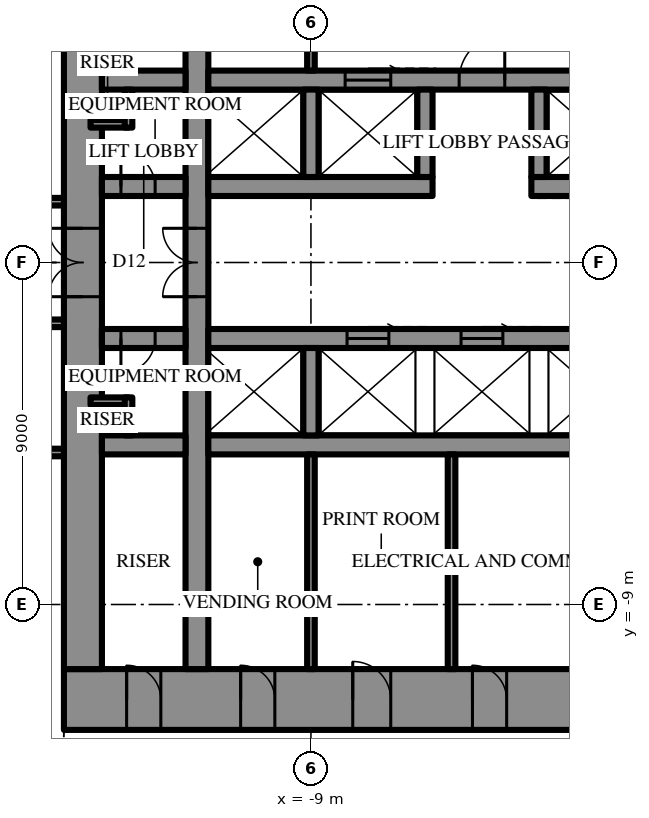
"""IFC4 building model, lengths in metres.
Left out: names, types, materials, properties, quantities, classifications, styles, units other than length and angle.
Written with IfcOpenShell. Run it as: python <this file> out.ifc"""

import sys

from ifc_helpers import new_model, si_unit, direction, frame, frame_2d, origin, place, context, subcontext, project, spatial, rectangle, extrude, element, fill, save


model = new_model("IFC4")
c1 = context("Model", 3, precision=1e-05, world=origin(), true_north=direction((0.0, 1.0)))
c2 = subcontext(c1, "Body", "Model", "MODEL_VIEW")
j1 = project(units=[si_unit("LENGTHUNIT", "METRE"), si_unit("PLANEANGLEUNIT", "RADIAN")], contexts=[c1])
p1 = place(None, origin())
s1 = spatial("IfcSite", under=j1, at=p1, CompositionType="ELEMENT")
p2 = place(p1, origin())
s2 = spatial("IfcBuilding", under=s1, at=p2, CompositionType="ELEMENT")
p3 = place(p2, frame((0.0, 0.0, 265.9)))
s3 = spatial("IfcBuildingStorey", under=s2, at=p3, CompositionType="ELEMENT", Elevation=265.9)
p4 = place(p3, frame((15.5, -11.5, 0.0), z_axis=(0.0, 0.0, 1.0), x_axis=(-1.0, 0.0, 0.0)))
e1 = element("IfcWall", 1, at=p4, inside=s3, PredefinedType="SHEAR", context=c2, shape_type="SweptSolid", body=[
    extrude(rectangle(XDim=31.0, YDim=1.6, at=frame_2d((15.5, 0.0))), origin(), (0.0, 0.0, 1.0), 4.2),
])
p5 = place(p4, frame((16.35, 0.0, 0.0)))
e2 = element("IfcOpeningElement", 2, at=p5, cuts=e1, PredefinedType="OPENING", context=c2, shape_type="SweptSolid", body=[
    extrude(rectangle(XDim=0.9, YDim=2.2, at=frame_2d((0.45, 1.1))), frame((0.0, 0.81, 0.0), z_axis=(0.0, -1.0, 0.0), x_axis=(1.0, 0.0, 0.0)), (0.0, 0.0, 1.0), 1.62),
])
p6 = place(p4, frame((19.35, 0.0, 0.0)))
e3 = element("IfcOpeningElement", 3, at=p6, cuts=e1, PredefinedType="OPENING", context=c2, shape_type="SweptSolid", body=[
    extrude(rectangle(XDim=0.9, YDim=2.2, at=frame_2d((0.45, 1.1))), frame((0.0, 0.81, 0.0), z_axis=(0.0, -1.0, 0.0), x_axis=(1.0, 0.0, 0.0)), (0.0, 0.0, 1.0), 1.62),
])
p7 = place(p4, frame((22.4, 0.0, 0.0)))
e4 = element("IfcOpeningElement", 4, at=p7, cuts=e1, PredefinedType="OPENING", context=c2, shape_type="SweptSolid", body=[
    extrude(rectangle(XDim=1.0, YDim=2.2, at=frame_2d((0.5, 1.1))), frame((0.0, 0.81, 0.0), z_axis=(0.0, -1.0, 0.0), x_axis=(1.0, 0.0, 0.0)), (0.0, 0.0, 1.0), 1.62),
])
p8 = place(p4, frame((1.65, 0.0, 0.0)))
e5 = element("IfcOpeningElement", 5, at=p8, cuts=e1, PredefinedType="OPENING", context=c2, shape_type="SweptSolid", body=[
    extrude(rectangle(XDim=0.9, YDim=2.2, at=frame_2d((0.45, 1.1))), frame((0.0, 0.81, 0.0), z_axis=(0.0, -1.0, 0.0), x_axis=(1.0, 0.0, 0.0)), (0.0, 0.0, 1.0), 1.62),
])
p9 = place(p4, frame((4.65, 0.0, 0.0)))
e6 = element("IfcOpeningElement", 6, at=p9, cuts=e1, PredefinedType="OPENING", context=c2, shape_type="SweptSolid", body=[
    extrude(rectangle(XDim=0.9, YDim=2.2, at=frame_2d((0.45, 1.1))), frame((0.0, 0.81, 0.0), z_axis=(0.0, -1.0, 0.0), x_axis=(1.0, 0.0, 0.0)), (0.0, 0.0, 1.0), 1.62),
])
p10 = place(p4, frame((25.45, 0.0, 0.0)))
e7 = element("IfcOpeningElement", 7, at=p10, cuts=e1, PredefinedType="OPENING", context=c2, shape_type="SweptSolid", body=[
    extrude(rectangle(XDim=0.9, YDim=2.2, at=frame_2d((0.45, 1.1))), frame((0.0, 0.81, 0.0), z_axis=(0.0, -1.0, 0.0), x_axis=(1.0, 0.0, 0.0)), (0.0, 0.0, 1.0), 1.62),
])
p11 = place(p4, frame((28.45, 0.0, 0.0)))
e8 = element("IfcOpeningElement", 8, at=p11, cuts=e1, PredefinedType="OPENING", context=c2, shape_type="SweptSolid", body=[
    extrude(rectangle(XDim=0.9, YDim=2.2, at=frame_2d((0.45, 1.1))), frame((0.0, 0.81, 0.0), z_axis=(0.0, -1.0, 0.0), x_axis=(1.0, 0.0, 0.0)), (0.0, 0.0, 1.0), 1.62),
])
p12 = place(p3, frame((-15.0, 10.7, 0.0), z_axis=(0.0, 0.0, 1.0), x_axis=(0.0, -1.0, 0.0)))
e9 = element("IfcWall", 9, at=p12, inside=s3, PredefinedType="SHEAR", context=c2, shape_type="SweptSolid", body=[
    extrude(rectangle(XDim=21.4, YDim=1.0, at=frame_2d((10.7, 0.0))), origin(), (0.0, 0.0, 1.0), 4.2),
])
p13 = place(p12, frame((9.8, 0.0, 0.0)))
e10 = element("IfcOpeningElement", 10, at=p13, cuts=e9, PredefinedType="OPENING", context=c2, shape_type="SweptSolid", body=[
    extrude(rectangle(XDim=1.8, YDim=2.4, at=frame_2d((0.9, 1.2))), frame((0.0, 0.51, 0.0), z_axis=(0.0, -1.0, 0.0), x_axis=(1.0, 0.0, 0.0)), (0.0, 0.0, 1.0), 1.02),
])
p14 = place(p3, frame((-12.0, -10.7, 0.0), z_axis=(0.0, 0.0, 1.0), x_axis=(0.0, 1.0, 0.0)))
e11 = element("IfcWall", 11, at=p14, inside=s3, PredefinedType="SHEAR", context=c2, shape_type="SweptSolid", body=[
    extrude(rectangle(XDim=21.4, YDim=0.6, at=frame_2d((10.7, 0.0))), origin(), (0.0, 0.0, 1.0), 4.2),
])
p15 = place(p14, frame((9.8, 0.0, 0.0)))
e12 = element("IfcOpeningElement", 12, at=p15, cuts=e11, PredefinedType="OPENING", context=c2, shape_type="SweptSolid", body=[
    extrude(rectangle(XDim=1.8, YDim=2.4, at=frame_2d((0.9, 1.2))), frame((0.0, 0.31, 0.0), z_axis=(0.0, -1.0, 0.0), x_axis=(1.0, 0.0, 0.0)), (0.0, 0.0, 1.0), 0.62),
])
p16 = place(p3, frame((-14.5, 2.0, 0.0), z_axis=(0.0, 0.0, 1.0), x_axis=(1.0, 0.0, 0.0)))
e13 = element("IfcWall", 13, at=p16, inside=s3, PredefinedType="SHEAR", context=c2, shape_type="SweptSolid", body=[
    extrude(rectangle(XDim=2.2, YDim=0.5, at=frame_2d((1.1, 0.0))), origin(), (0.0, 0.0, 1.0), 4.2),
])
p17 = place(p16, frame((0.5, 0.0, 0.0)))
e14 = element("IfcOpeningElement", 14, at=p17, cuts=e13, PredefinedType="OPENING", context=c2, shape_type="SweptSolid", body=[
    extrude(rectangle(XDim=0.9, YDim=2.2, at=frame_2d((0.45, 1.1))), frame((0.0, 0.26, 0.0), z_axis=(0.0, -1.0, 0.0), x_axis=(1.0, 0.0, 0.0)), (0.0, 0.0, 1.0), 0.52),
])
p18 = place(p3, frame((-11.7, 2.0, 0.0), z_axis=(0.0, 0.0, 1.0), x_axis=(1.0, 0.0, 0.0)))
e15 = element("IfcWall", 15, at=p18, inside=s3, PredefinedType="SHEAR", context=c2, shape_type="SweptSolid", body=[
    extrude(rectangle(XDim=5.9, YDim=0.5, at=frame_2d((2.95, 0.0))), origin(), (0.0, 0.0, 1.0), 4.2),
])
p19 = place(p3, frame((-3.2, 2.0, 0.0), z_axis=(0.0, 0.0, 1.0), x_axis=(1.0, 0.0, 0.0)))
e16 = element("IfcWall", 16, at=p19, inside=s3, PredefinedType="SHEAR", context=c2, shape_type="SweptSolid", body=[
    extrude(rectangle(XDim=14.9, YDim=0.5, at=frame_2d((7.45, 0.0))), origin(), (0.0, 0.0, 1.0), 4.2),
])
p20 = place(p19, frame((1.15, 0.0, 0.0)))
e17 = element("IfcOpeningElement", 17, at=p20, cuts=e16, PredefinedType="OPENING", context=c2, shape_type="SweptSolid", body=[
    extrude(rectangle(XDim=1.1, YDim=2.2, at=frame_2d((0.55, 1.1))), frame((0.0, 0.26, 0.0), z_axis=(0.0, -1.0, 0.0), x_axis=(1.0, 0.0, 0.0)), (0.0, 0.0, 1.0), 0.52),
])
p21 = place(p19, frame((4.15, 0.0, 0.0)))
e18 = element("IfcOpeningElement", 18, at=p21, cuts=e16, PredefinedType="OPENING", context=c2, shape_type="SweptSolid", body=[
    extrude(rectangle(XDim=1.1, YDim=2.2, at=frame_2d((0.55, 1.1))), frame((0.0, 0.26, 0.0), z_axis=(0.0, -1.0, 0.0), x_axis=(1.0, 0.0, 0.0)), (0.0, 0.0, 1.0), 0.52),
])
p22 = place(p19, frame((7.15, 0.0, 0.0)))
e19 = element("IfcOpeningElement", 19, at=p22, cuts=e16, PredefinedType="OPENING", context=c2, shape_type="SweptSolid", body=[
    extrude(rectangle(XDim=1.1, YDim=2.2, at=frame_2d((0.55, 1.1))), frame((0.0, 0.26, 0.0), z_axis=(0.0, -1.0, 0.0), x_axis=(1.0, 0.0, 0.0)), (0.0, 0.0, 1.0), 0.52),
])
p23 = place(p19, frame((10.15, 0.0, 0.0)))
e20 = element("IfcOpeningElement", 20, at=p23, cuts=e16, PredefinedType="OPENING", context=c2, shape_type="SweptSolid", body=[
    extrude(rectangle(XDim=1.1, YDim=2.2, at=frame_2d((0.55, 1.1))), frame((0.0, 0.26, 0.0), z_axis=(0.0, -1.0, 0.0), x_axis=(1.0, 0.0, 0.0)), (0.0, 0.0, 1.0), 0.52),
])
p24 = place(p3, frame((-14.5, 4.8, 0.0), z_axis=(0.0, 0.0, 1.0), x_axis=(1.0, 0.0, 0.0)))
e21 = element("IfcWall", 21, at=p24, inside=s3, PredefinedType="SHEAR", context=c2, shape_type="SweptSolid", body=[
    extrude(rectangle(XDim=2.2, YDim=0.5, at=frame_2d((1.1, 0.0))), origin(), (0.0, 0.0, 1.0), 4.2),
])
p25 = place(p3, frame((-11.7, 4.8, 0.0), z_axis=(0.0, 0.0, 1.0), x_axis=(1.0, 0.0, 0.0)))
e22 = element("IfcWall", 22, at=p25, inside=s3, PredefinedType="SHEAR", context=c2, shape_type="SweptSolid", body=[
    extrude(rectangle(XDim=23.4, YDim=0.5, at=frame_2d((11.7, 0.0))), origin(), (0.0, 0.0, 1.0), 4.2),
])
p26 = place(p25, frame((6.6, 0.0, 0.0)))
e23 = element("IfcOpeningElement", 23, at=p26, cuts=e22, PredefinedType="OPENING", context=c2, shape_type="SweptSolid", body=[
    extrude(rectangle(XDim=1.2, YDim=2.2, at=frame_2d((0.6, 1.1))), frame((0.0, 0.26, 0.0), z_axis=(0.0, -1.0, 0.0), x_axis=(1.0, 0.0, 0.0)), (0.0, 0.0, 1.0), 0.52),
])
p27 = place(p25, frame((3.6, 0.0, 0.0)))
e24 = element("IfcOpeningElement", 24, at=p27, cuts=e22, PredefinedType="OPENING", context=c2, shape_type="SweptSolid", body=[
    extrude(rectangle(XDim=1.2, YDim=2.2, at=frame_2d((0.6, 1.1))), frame((0.0, 0.26, 0.0), z_axis=(0.0, -1.0, 0.0), x_axis=(1.0, 0.0, 0.0)), (0.0, 0.0, 1.0), 0.52),
])
for number, where, z_axis, x_axis in (
    (25, (-9.0, 2.25, 0.0), (0.0, 0.0, 1.0), (0.0, 1.0, 0.0)),
    (26, (-6.0, 2.25, 0.0), (0.0, 0.0, 1.0), (0.0, 1.0, 0.0)),
    (27, (-3.0, 2.25, 0.0), (0.0, 0.0, 1.0), (0.0, 1.0, 0.0)),
):
    element("IfcWall", number, at=place(p3, frame(where, z_axis=z_axis, x_axis=x_axis)), inside=s3, PredefinedType="SHEAR", context=c2, shape_type="SweptSolid", body=[
        extrude(rectangle(XDim=2.3, YDim=0.4, at=frame_2d((1.15, 0.0))), origin(), (0.0, 0.0, 1.0), 4.2),
    ])
p28 = place(p3, frame((3.2, -2.0, 0.0), z_axis=(0.0, 0.0, 1.0), x_axis=(-1.0, 0.0, 0.0)))
e28 = element("IfcWall", 28, at=p28, inside=s3, PredefinedType="SHEAR", context=c2, shape_type="SweptSolid", body=[
    extrude(rectangle(XDim=14.9, YDim=0.5, at=frame_2d((7.45, 0.0))), origin(), (0.0, 0.0, 1.0), 4.2),
])
p29 = place(p28, frame((1.15, 0.0, 0.0)))
e29 = element("IfcOpeningElement", 29, at=p29, cuts=e28, PredefinedType="OPENING", context=c2, shape_type="SweptSolid", body=[
    extrude(rectangle(XDim=1.1, YDim=2.2, at=frame_2d((0.55, 1.1))), frame((0.0, 0.26, 0.0), z_axis=(0.0, -1.0, 0.0), x_axis=(1.0, 0.0, 0.0)), (0.0, 0.0, 1.0), 0.52),
])
p30 = place(p28, frame((4.15, 0.0, 0.0)))
e30 = element("IfcOpeningElement", 30, at=p30, cuts=e28, PredefinedType="OPENING", context=c2, shape_type="SweptSolid", body=[
    extrude(rectangle(XDim=1.1, YDim=2.2, at=frame_2d((0.55, 1.1))), frame((0.0, 0.26, 0.0), z_axis=(0.0, -1.0, 0.0), x_axis=(1.0, 0.0, 0.0)), (0.0, 0.0, 1.0), 0.52),
])
p31 = place(p28, frame((7.15, 0.0, 0.0)))
e31 = element("IfcOpeningElement", 31, at=p31, cuts=e28, PredefinedType="OPENING", context=c2, shape_type="SweptSolid", body=[
    extrude(rectangle(XDim=1.1, YDim=2.2, at=frame_2d((0.55, 1.1))), frame((0.0, 0.26, 0.0), z_axis=(0.0, -1.0, 0.0), x_axis=(1.0, 0.0, 0.0)), (0.0, 0.0, 1.0), 0.52),
])
p32 = place(p28, frame((10.15, 0.0, 0.0)))
e32 = element("IfcOpeningElement", 32, at=p32, cuts=e28, PredefinedType="OPENING", context=c2, shape_type="SweptSolid", body=[
    extrude(rectangle(XDim=1.1, YDim=2.2, at=frame_2d((0.55, 1.1))), frame((0.0, 0.26, 0.0), z_axis=(0.0, -1.0, 0.0), x_axis=(1.0, 0.0, 0.0)), (0.0, 0.0, 1.0), 0.52),
])
p33 = place(p3, frame((-12.3, -2.0, 0.0), z_axis=(0.0, 0.0, 1.0), x_axis=(-1.0, 0.0, 0.0)))
e33 = element("IfcWall", 33, at=p33, inside=s3, PredefinedType="SHEAR", context=c2, shape_type="SweptSolid", body=[
    extrude(rectangle(XDim=2.2, YDim=0.5, at=frame_2d((1.1, 0.0))), origin(), (0.0, 0.0, 1.0), 4.2),
])
p34 = place(p33, frame((0.8, 0.0, 0.0)))
e34 = element("IfcOpeningElement", 34, at=p34, cuts=e33, PredefinedType="OPENING", context=c2, shape_type="SweptSolid", body=[
    extrude(rectangle(XDim=0.9, YDim=2.2, at=frame_2d((0.45, 1.1))), frame((0.0, 0.26, 0.0), z_axis=(0.0, -1.0, 0.0), x_axis=(1.0, 0.0, 0.0)), (0.0, 0.0, 1.0), 0.52),
])
p35 = place(p3, frame((11.7, -4.8, 0.0), z_axis=(0.0, 0.0, 1.0), x_axis=(-1.0, 0.0, 0.0)))
e35 = element("IfcWall", 35, at=p35, inside=s3, PredefinedType="SHEAR", context=c2, shape_type="SweptSolid", body=[
    extrude(rectangle(XDim=23.4, YDim=0.5, at=frame_2d((11.7, 0.0))), origin(), (0.0, 0.0, 1.0), 4.2),
])
p36 = place(p35, frame((6.6, 0.0, 0.0)))
e36 = element("IfcOpeningElement", 36, at=p36, cuts=e35, PredefinedType="OPENING", context=c2, shape_type="SweptSolid", body=[
    extrude(rectangle(XDim=1.2, YDim=2.2, at=frame_2d((0.6, 1.1))), frame((0.0, 0.26, 0.0), z_axis=(0.0, -1.0, 0.0), x_axis=(1.0, 0.0, 0.0)), (0.0, 0.0, 1.0), 0.52),
])
p37 = place(p35, frame((3.6, 0.0, 0.0)))
e37 = element("IfcOpeningElement", 37, at=p37, cuts=e35, PredefinedType="OPENING", context=c2, shape_type="SweptSolid", body=[
    extrude(rectangle(XDim=1.2, YDim=2.2, at=frame_2d((0.6, 1.1))), frame((0.0, 0.26, 0.0), z_axis=(0.0, -1.0, 0.0), x_axis=(1.0, 0.0, 0.0)), (0.0, 0.0, 1.0), 0.52),
])
p38 = place(p3, frame((-12.3, -4.8, 0.0), z_axis=(0.0, 0.0, 1.0), x_axis=(-1.0, 0.0, 0.0)))
e38 = element("IfcWall", 38, at=p38, inside=s3, PredefinedType="SHEAR", context=c2, shape_type="SweptSolid", body=[
    extrude(rectangle(XDim=2.2, YDim=0.5, at=frame_2d((1.1, 0.0))), origin(), (0.0, 0.0, 1.0), 4.2),
])
p39 = place(p3, frame((-9.0, -2.25, 0.0), z_axis=(0.0, 0.0, 1.0), x_axis=(0.0, -1.0, 0.0)))
e39 = element("IfcWall", 39, at=p39, inside=s3, PredefinedType="SHEAR", context=c2, shape_type="SweptSolid", body=[
    extrude(rectangle(XDim=2.3, YDim=0.4, at=frame_2d((1.15, 0.0))), origin(), (0.0, 0.0, 1.0), 4.2),
])
for number, where, z_axis, x_axis in (
    (40, (-9.0, 5.05, 0.0), (0.0, 0.0, 1.0), (0.0, 1.0, 0.0)),
    (41, (-9.0, -5.05, 0.0), (0.0, 0.0, 1.0), (0.0, -1.0, 0.0)),
    (42, (-5.3, -5.05, 0.0), (0.0, 0.0, 1.0), (0.0, -1.0, 0.0)),
):
    element("IfcWall", number, at=place(p3, frame(where, z_axis=z_axis, x_axis=x_axis)), inside=s3, PredefinedType="PARTITIONING", context=c2, shape_type="SweptSolid", body=[
        extrude(rectangle(XDim=5.65, YDim=0.2, at=frame_2d((2.825, 0.0))), origin(), (0.0, 0.0, 1.0), 4.0),
    ])
for number, where, z_axis, x_axis in (
    (43, (-14.8, 3.65, 0.0), (0.0, 0.0, 1.0), (1.0, 0.0, 0.0)),
    (44, (-13.8, 3.55, 0.0), (0.0, 0.0, 1.0), (0.0, 1.0, 0.0)),
    (45, (-13.8, -3.65, 0.0), (0.0, 0.0, 1.0), (-1.0, 0.0, 0.0)),
    (46, (-13.8, -3.55, 0.0), (0.0, 0.0, 1.0), (0.0, -1.0, 0.0)),
):
    element("IfcWall", number, at=place(p3, frame(where, z_axis=z_axis, x_axis=x_axis)), inside=s3, PredefinedType="PARTITIONING", context=c2, shape_type="SweptSolid", body=[
        extrude(rectangle(XDim=1.0, YDim=0.2, at=frame_2d((0.5, 0.0))), origin(), (0.0, 0.0, 1.0), 4.0),
    ])
p40 = place(p3, frame((-15.5, 1.6, 0.0), z_axis=(0.0, 0.0, 1.0), x_axis=(-1.0, 0.0, 0.0)))
e47 = element("IfcWall", 47, at=p40, inside=s3, PredefinedType="PARTITIONING", context=c2, shape_type="SweptSolid", body=[
    extrude(rectangle(XDim=11.7, YDim=0.2, at=frame_2d((5.85, 0.0))), origin(), (0.0, 0.0, 1.0), 4.0),
])
p41 = place(p40, frame((3.01, 0.0, 0.0)))
e48 = element("IfcOpeningElement", 48, at=p41, cuts=e47, PredefinedType="OPENING", context=c2, shape_type="SweptSolid", body=[
    extrude(rectangle(XDim=1.0, YDim=2.2, at=frame_2d((0.5, 1.1))), frame((0.0, 0.11, 0.0), z_axis=(0.0, -1.0, 0.0), x_axis=(1.0, 0.0, 0.0)), (0.0, 0.0, 1.0), 0.22),
])
p42 = place(p3, frame((-15.5, -1.6, 0.0), z_axis=(0.0, 0.0, 1.0), x_axis=(-1.0, 0.0, 0.0)))
e49 = element("IfcWall", 49, at=p42, inside=s3, PredefinedType="PARTITIONING", context=c2, shape_type="SweptSolid", body=[
    extrude(rectangle(XDim=11.7, YDim=0.2, at=frame_2d((5.85, 0.0))), origin(), (0.0, 0.0, 1.0), 4.0),
])
p43 = place(p42, frame((3.01, 0.0, 0.0)))
e50 = element("IfcOpeningElement", 50, at=p43, cuts=e49, PredefinedType="OPENING", context=c2, shape_type="SweptSolid", body=[
    extrude(rectangle(XDim=1.0, YDim=2.2, at=frame_2d((0.5, 1.1))), frame((0.0, 0.11, 0.0), z_axis=(0.0, -1.0, 0.0), x_axis=(1.0, 0.0, 0.0)), (0.0, 0.0, 1.0), 0.22),
])
p44 = place(p3, frame((-15.5, -5.0, 0.0), z_axis=(0.0, 0.0, 1.0), x_axis=(-1.0, 0.0, 0.0)))
e51 = element("IfcWall", 51, at=p44, inside=s3, PredefinedType="PARTITIONING", context=c2, shape_type="SweptSolid", body=[
    extrude(rectangle(XDim=14.845, YDim=0.2, at=frame_2d((7.423, 0.0))), origin(), (0.0, 0.0, 1.0), 4.0),
])
p45 = place(p44, frame((0.985, 0.0, 0.0)))
e52 = element("IfcOpeningElement", 52, at=p45, cuts=e51, PredefinedType="OPENING", context=c2, shape_type="SweptSolid", body=[
    extrude(rectangle(XDim=1.0, YDim=2.2, at=frame_2d((0.5, 1.1))), frame((0.0, 0.11, 0.0), z_axis=(0.0, -1.0, 0.0), x_axis=(1.0, 0.0, 0.0)), (0.0, 0.0, 1.0), 0.22),
])
p46 = place(p13, frame((1.8, 0.0, 0.0), z_axis=(0.0, 0.0, 1.0), x_axis=(-1.0, 0.0, 0.0)))
e53 = element("IfcDoor", 53, at=p46, inside=s3, OperationType="DOUBLE_DOOR_SINGLE_SWING", PredefinedType="DOOR", context=c2, shape_type="SweptSolid", body=[
    extrude(rectangle(XDim=1.8, YDim=2.4, at=frame_2d((0.9, 1.2))), frame((0.0, 0.025, 0.0), z_axis=(0.0, -1.0, 0.0), x_axis=(1.0, 0.0, 0.0)), (0.0, 0.0, 1.0), 0.05),
])
fill(e10, e53)
p47 = place(p26, origin())
e54 = element("IfcDoor", 54, at=p47, inside=s3, OperationType="SINGLE_SWING_LEFT", PredefinedType="DOOR", context=c2, shape_type="SweptSolid", body=[
    extrude(rectangle(XDim=1.2, YDim=2.2, at=frame_2d((0.6, 1.1))), frame((0.0, 0.025, 0.0), z_axis=(0.0, -1.0, 0.0), x_axis=(1.0, 0.0, 0.0)), (0.0, 0.0, 1.0), 0.05),
])
fill(e23, e54)
p48 = place(p6, frame((0.9, 0.0, 0.0), z_axis=(0.0, 0.0, 1.0), x_axis=(-1.0, 0.0, 0.0)))
e55 = element("IfcDoor", 55, at=p48, inside=s3, OperationType="SINGLE_SWING_RIGHT", PredefinedType="DOOR", context=c2, shape_type="SweptSolid", body=[
    extrude(rectangle(XDim=0.9, YDim=2.2, at=frame_2d((0.45, 1.1))), frame((0.0, 0.025, 0.0), z_axis=(0.0, -1.0, 0.0), x_axis=(1.0, 0.0, 0.0)), (0.0, 0.0, 1.0), 0.05),
])
fill(e3, e55)
p49 = place(p7, frame((1.0, 0.0, 0.0), z_axis=(0.0, 0.0, 1.0), x_axis=(-1.0, 0.0, 0.0)))
e56 = element("IfcDoor", 56, at=p49, inside=s3, OperationType="SINGLE_SWING_RIGHT", PredefinedType="DOOR", context=c2, shape_type="SweptSolid", body=[
    extrude(rectangle(XDim=1.0, YDim=2.2, at=frame_2d((0.5, 1.1))), frame((0.0, 0.025, 0.0), z_axis=(0.0, -1.0, 0.0), x_axis=(1.0, 0.0, 0.0)), (0.0, 0.0, 1.0), 0.05),
])
fill(e4, e56)
p50 = place(p10, frame((0.9, 0.0, 0.0), z_axis=(0.0, 0.0, 1.0), x_axis=(-1.0, 0.0, 0.0)))
e57 = element("IfcDoor", 57, at=p50, inside=s3, OperationType="SINGLE_SWING_RIGHT", PredefinedType="DOOR", context=c2, shape_type="SweptSolid", body=[
    extrude(rectangle(XDim=0.9, YDim=2.2, at=frame_2d((0.45, 1.1))), frame((0.0, 0.025, 0.0), z_axis=(0.0, -1.0, 0.0), x_axis=(1.0, 0.0, 0.0)), (0.0, 0.0, 1.0), 0.05),
])
fill(e7, e57)
p51 = place(p11, frame((0.9, 0.0, 0.0), z_axis=(0.0, 0.0, 1.0), x_axis=(-1.0, 0.0, 0.0)))
e58 = element("IfcDoor", 58, at=p51, inside=s3, OperationType="SINGLE_SWING_RIGHT", PredefinedType="DOOR", context=c2, shape_type="SweptSolid", body=[
    extrude(rectangle(XDim=0.9, YDim=2.2, at=frame_2d((0.45, 1.1))), frame((0.0, 0.025, 0.0), z_axis=(0.0, -1.0, 0.0), x_axis=(1.0, 0.0, 0.0)), (0.0, 0.0, 1.0), 0.05),
])
fill(e8, e58)
p52 = place(p17, origin())
e59 = element("IfcDoor", 59, at=p52, inside=s3, OperationType="SINGLE_SWING_RIGHT", PredefinedType="DOOR", context=c2, shape_type="SweptSolid", body=[
    extrude(rectangle(XDim=0.9, YDim=2.2, at=frame_2d((0.45, 1.1))), frame((0.0, 0.025, 0.0), z_axis=(0.0, -1.0, 0.0), x_axis=(1.0, 0.0, 0.0)), (0.0, 0.0, 1.0), 0.05),
])
fill(e14, e59)
p53 = place(p34, origin())
e60 = element("IfcDoor", 60, at=p53, inside=s3, OperationType="SINGLE_SWING_LEFT", PredefinedType="DOOR", context=c2, shape_type="SweptSolid", body=[
    extrude(rectangle(XDim=0.9, YDim=2.2, at=frame_2d((0.45, 1.1))), frame((0.0, 0.025, 0.0), z_axis=(0.0, -1.0, 0.0), x_axis=(1.0, 0.0, 0.0)), (0.0, 0.0, 1.0), 0.05),
])
fill(e34, e60)
p54 = place(p15, origin())
e61 = element("IfcDoor", 61, at=p54, inside=s3, OperationType="DOUBLE_DOOR_SINGLE_SWING", PredefinedType="DOOR", context=c2, shape_type="SweptSolid", body=[
    extrude(rectangle(XDim=1.8, YDim=2.4, at=frame_2d((0.9, 1.2))), frame((0.0, 0.025, 0.0), z_axis=(0.0, -1.0, 0.0), x_axis=(1.0, 0.0, 0.0)), (0.0, 0.0, 1.0), 0.05),
])
fill(e12, e61)
p55 = place(p27, origin())
e62 = element("IfcDoor", 62, at=p55, inside=s3, OperationType="SLIDING_TO_LEFT", PredefinedType="DOOR", context=c2, shape_type="SweptSolid", body=[
    extrude(rectangle(XDim=1.2, YDim=2.2, at=frame_2d((0.6, 1.1))), frame((0.0, 0.025, 0.0), z_axis=(0.0, -1.0, 0.0), x_axis=(1.0, 0.0, 0.0)), (0.0, 0.0, 1.0), 0.05),
])
fill(e24, e62)
p56 = place(p31, frame((1.1, 0.0, 0.0), z_axis=(0.0, 0.0, 1.0), x_axis=(-1.0, 0.0, 0.0)))
e63 = element("IfcDoor", 63, at=p56, inside=s3, OperationType="SLIDING_TO_LEFT", PredefinedType="DOOR", context=c2, shape_type="SweptSolid", body=[
    extrude(rectangle(XDim=1.1, YDim=2.2, at=frame_2d((0.55, 1.1))), frame((0.0, 0.025, 0.0), z_axis=(0.0, -1.0, 0.0), x_axis=(1.0, 0.0, 0.0)), (0.0, 0.0, 1.0), 0.05),
])
fill(e31, e63)
p57 = place(p32, frame((1.1, 0.0, 0.0), z_axis=(0.0, 0.0, 1.0), x_axis=(-1.0, 0.0, 0.0)))
e64 = element("IfcDoor", 64, at=p57, inside=s3, OperationType="SLIDING_TO_LEFT", PredefinedType="DOOR", context=c2, shape_type="SweptSolid", body=[
    extrude(rectangle(XDim=1.1, YDim=2.2, at=frame_2d((0.55, 1.1))), frame((0.0, 0.025, 0.0), z_axis=(0.0, -1.0, 0.0), x_axis=(1.0, 0.0, 0.0)), (0.0, 0.0, 1.0), 0.05),
])
fill(e32, e64)
save(model, sys.argv[1])
